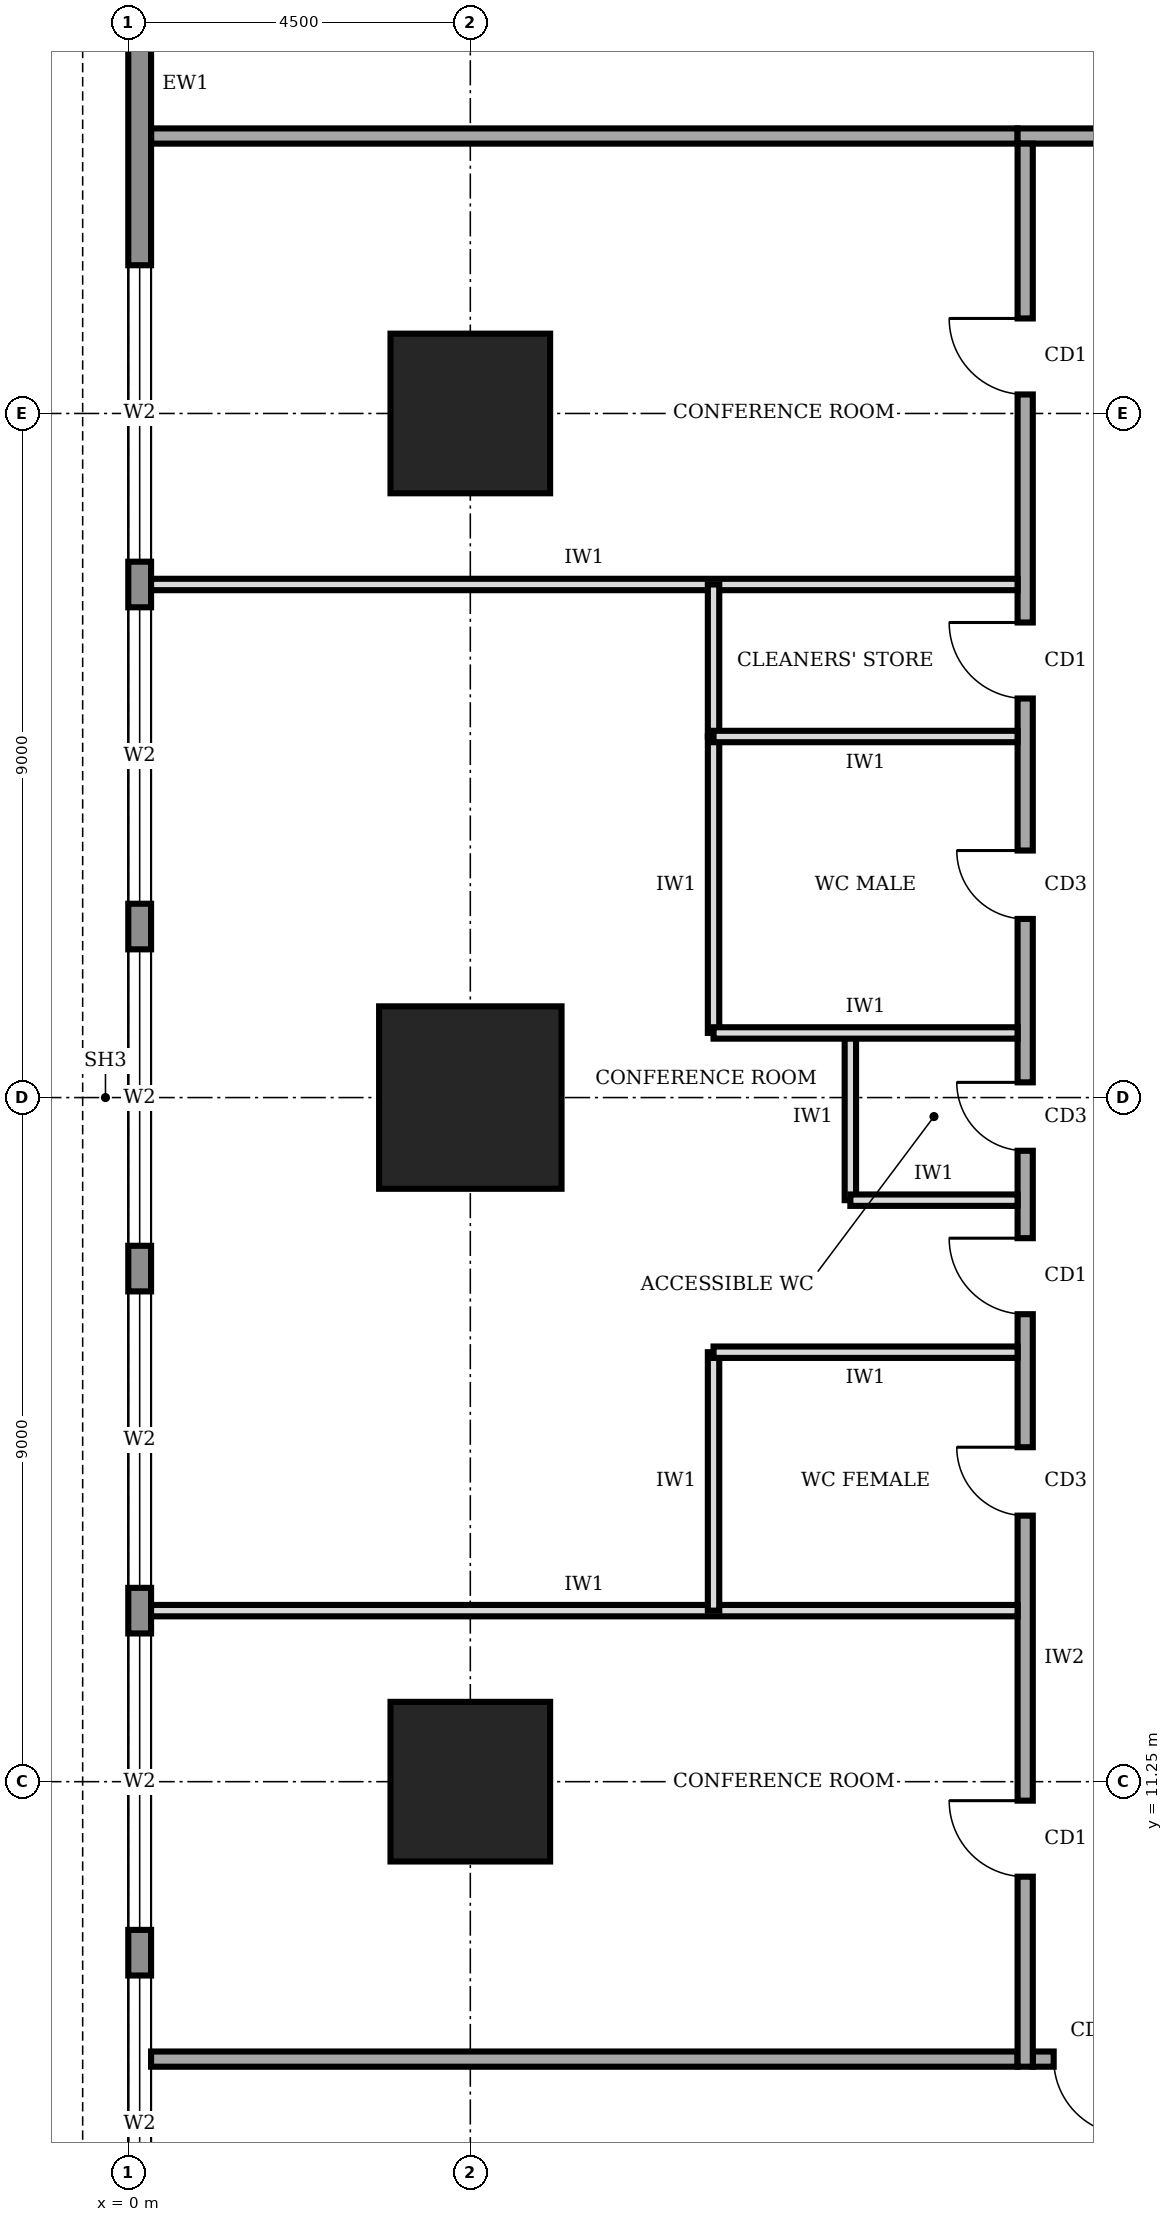
"""IFC4 building model, lengths in metres.
Left out: names, types, materials, properties, quantities, classifications, styles, units other than length and angle.
Written with IfcOpenShell. Run it as: python <this file> out.ifc"""

import sys

from ifc_helpers import new_model, si_unit, direction, frame, frame_2d, origin, origin_2d, place, context, subcontext, project, spatial, rectangle, extrude, element, fill, save


model = new_model("IFC4")
c1 = context("Model", 3, precision=1e-05, world=origin(), true_north=direction((0.0, 1.0)))
c2 = subcontext(c1, "Body", "Model", "MODEL_VIEW")
j1 = project(units=[si_unit("LENGTHUNIT", "METRE"), si_unit("PLANEANGLEUNIT", "RADIAN")], contexts=[c1])
p1 = place(None, origin())
s1 = spatial("IfcSite", under=j1, at=p1, CompositionType="ELEMENT")
p2 = place(p1, origin())
s2 = spatial("IfcBuilding", under=s1, at=p2, CompositionType="ELEMENT")
p3 = place(p2, frame((0.0, 0.0, 153.0)))
s3 = spatial("IfcBuildingStorey", under=s2, at=p3, CompositionType="ELEMENT", Elevation=153.0)
p4 = place(p3, frame((4.5, 11.25, 0.0), z_axis=(0.0, 0.0, 1.0), x_axis=(1.0, 0.0, 0.0)))
e1 = element("IfcColumn", 1, at=p4, inside=s3, PredefinedType="COLUMN", context=c2, shape_type="SweptSolid", body=[
    extrude(rectangle(XDim=2.1, YDim=2.1, at=origin_2d()), origin(), (0.0, 0.0, 1.0), 4.0),
])
p5 = place(p3, frame((4.5, 20.25, 0.0), z_axis=(0.0, 0.0, 1.0), x_axis=(1.0, 0.0, 0.0)))
e2 = element("IfcColumn", 2, at=p5, inside=s3, PredefinedType="COLUMN", context=c2, shape_type="SweptSolid", body=[
    extrude(rectangle(XDim=2.4, YDim=2.4, at=origin_2d()), origin(), (0.0, 0.0, 1.0), 4.0),
])
p6 = place(p3, frame((4.5, 29.25, 0.0), z_axis=(0.0, 0.0, 1.0), x_axis=(1.0, 0.0, 0.0)))
e3 = element("IfcColumn", 3, at=p6, inside=s3, PredefinedType="COLUMN", context=c2, shape_type="SweptSolid", body=[
    extrude(rectangle(XDim=2.1, YDim=2.1, at=origin_2d()), origin(), (0.0, 0.0, 1.0), 4.0),
])
p7 = place(p3, frame((0.15, 35.98, 0.0), z_axis=(0.0, 0.0, 1.0), x_axis=(0.0, -1.0, 0.0)))
e4 = element("IfcWall", 4, at=p7, inside=s3, PredefinedType="STANDARD", context=c2, shape_type="SweptSolid", body=[
    extrude(rectangle(XDim=31.46, YDim=0.3, at=frame_2d((15.73, 0.0))), origin(), (0.0, 0.0, 1.0), 3.75),
])
p8 = place(p7, frame((27.28, 0.0, 0.6)))
e5 = element("IfcOpeningElement", 5, at=p8, cuts=e4, PredefinedType="OPENING", context=c2, shape_type="SweptSolid", body=[
    extrude(rectangle(XDim=3.9, YDim=2.6, at=frame_2d((1.95, 1.3))), frame((0.0, 0.16, 0.0), z_axis=(0.0, -1.0, 0.0), x_axis=(1.0, 0.0, 0.0)), (0.0, 0.0, 1.0), 0.32),
])
p9 = place(p7, frame((22.78, 0.0, 0.6)))
e6 = element("IfcOpeningElement", 6, at=p9, cuts=e4, PredefinedType="OPENING", context=c2, shape_type="SweptSolid", body=[
    extrude(rectangle(XDim=3.9, YDim=2.6, at=frame_2d((1.95, 1.3))), frame((0.0, 0.16, 0.0), z_axis=(0.0, -1.0, 0.0), x_axis=(1.0, 0.0, 0.0)), (0.0, 0.0, 1.0), 0.32),
])
p10 = place(p7, frame((18.28, 0.0, 0.6)))
e7 = element("IfcOpeningElement", 7, at=p10, cuts=e4, PredefinedType="OPENING", context=c2, shape_type="SweptSolid", body=[
    extrude(rectangle(XDim=3.9, YDim=2.6, at=frame_2d((1.95, 1.3))), frame((0.0, 0.16, 0.0), z_axis=(0.0, -1.0, 0.0), x_axis=(1.0, 0.0, 0.0)), (0.0, 0.0, 1.0), 0.32),
])
p11 = place(p7, frame((13.78, 0.0, 0.6)))
e8 = element("IfcOpeningElement", 8, at=p11, cuts=e4, PredefinedType="OPENING", context=c2, shape_type="SweptSolid", body=[
    extrude(rectangle(XDim=3.9, YDim=2.6, at=frame_2d((1.95, 1.3))), frame((0.0, 0.16, 0.0), z_axis=(0.0, -1.0, 0.0), x_axis=(1.0, 0.0, 0.0)), (0.0, 0.0, 1.0), 0.32),
])
p12 = place(p7, frame((9.28, 0.0, 0.6)))
e9 = element("IfcOpeningElement", 9, at=p12, cuts=e4, PredefinedType="OPENING", context=c2, shape_type="SweptSolid", body=[
    extrude(rectangle(XDim=3.9, YDim=2.6, at=frame_2d((1.95, 1.3))), frame((0.0, 0.16, 0.0), z_axis=(0.0, -1.0, 0.0), x_axis=(1.0, 0.0, 0.0)), (0.0, 0.0, 1.0), 0.32),
])
p13 = place(p7, frame((4.78, 0.0, 0.6)))
e10 = element("IfcOpeningElement", 10, at=p13, cuts=e4, PredefinedType="OPENING", context=c2, shape_type="SweptSolid", body=[
    extrude(rectangle(XDim=3.9, YDim=2.6, at=frame_2d((1.95, 1.3))), frame((0.0, 0.16, 0.0), z_axis=(0.0, -1.0, 0.0), x_axis=(1.0, 0.0, 0.0)), (0.0, 0.0, 1.0), 0.32),
])
p14 = place(p3, frame((11.9, 7.6, 0.0), z_axis=(0.0, 0.0, 1.0), x_axis=(1.0, 0.0, 0.0)))
e11 = element("IfcWall", 11, at=p14, inside=s3, PredefinedType="SOLIDWALL", context=c2, shape_type="SweptSolid", body=[
    extrude(rectangle(XDim=28.3, YDim=0.2, at=frame_2d((14.15, 0.0))), origin(), (0.0, 0.0, 1.0), 3.75),
])
p15 = place(p14, frame((0.275, 0.0, 0.0)))
e12 = element("IfcOpeningElement", 12, at=p15, cuts=e11, PredefinedType="OPENING", context=c2, shape_type="SweptSolid", body=[
    extrude(rectangle(XDim=1.0, YDim=2.1, at=frame_2d((0.5, 1.05))), frame((0.0, 0.11, 0.0), z_axis=(0.0, -1.0, 0.0), x_axis=(1.0, 0.0, 0.0)), (0.0, 0.0, 1.0), 0.22),
])
p16 = place(p14, frame((14.35, 0.0, 0.0)))
e13 = element("IfcOpeningElement", 13, at=p16, cuts=e11, PredefinedType="OPENING", context=c2, shape_type="SweptSolid", body=[
    extrude(rectangle(XDim=1.4, YDim=2.1, at=frame_2d((0.7, 1.05))), frame((0.0, 0.11, 0.0), z_axis=(0.0, -1.0, 0.0), x_axis=(1.0, 0.0, 0.0)), (0.0, 0.0, 1.0), 0.22),
])
p17 = place(p3, frame((40.2, 32.9, 0.0), z_axis=(0.0, 0.0, 1.0), x_axis=(-1.0, 0.0, 0.0)))
e14 = element("IfcWall", 14, at=p17, inside=s3, PredefinedType="SOLIDWALL", context=c2, shape_type="SweptSolid", body=[
    extrude(rectangle(XDim=28.5, YDim=0.2, at=frame_2d((14.25, 0.0))), origin(), (0.0, 0.0, 1.0), 3.75),
])
p18 = place(p17, frame((24.55, 0.0, 0.0)))
e15 = element("IfcOpeningElement", 15, at=p18, cuts=e14, PredefinedType="OPENING", context=c2, shape_type="SweptSolid", body=[
    extrude(rectangle(XDim=1.8, YDim=2.1, at=frame_2d((0.9, 1.05))), frame((0.0, 0.11, 0.0), z_axis=(0.0, -1.0, 0.0), x_axis=(1.0, 0.0, 0.0)), (0.0, 0.0, 1.0), 0.22),
])
p19 = place(p17, frame((17.2, 0.0, 0.0)))
e16 = element("IfcOpeningElement", 16, at=p19, cuts=e14, PredefinedType="OPENING", context=c2, shape_type="SweptSolid", body=[
    extrude(rectangle(XDim=1.0, YDim=2.1, at=frame_2d((0.5, 1.05))), frame((0.0, 0.11, 0.0), z_axis=(0.0, -1.0, 0.0), x_axis=(1.0, 0.0, 0.0)), (0.0, 0.0, 1.0), 0.22),
])
p20 = place(p17, frame((6.0, 0.0, 0.0)))
e17 = element("IfcOpeningElement", 17, at=p20, cuts=e14, PredefinedType="OPENING", context=c2, shape_type="SweptSolid", body=[
    extrude(rectangle(XDim=1.0, YDim=2.1, at=frame_2d((0.5, 1.05))), frame((0.0, 0.11, 0.0), z_axis=(0.0, -1.0, 0.0), x_axis=(1.0, 0.0, 0.0)), (0.0, 0.0, 1.0), 0.22),
])
p21 = place(p3, frame((11.8, 32.8, 0.0), z_axis=(0.0, 0.0, 1.0), x_axis=(0.0, -1.0, 0.0)))
e18 = element("IfcWall", 18, at=p21, inside=s3, PredefinedType="SOLIDWALL", context=c2, shape_type="SweptSolid", body=[
    extrude(rectangle(XDim=25.3, YDim=0.2, at=frame_2d((12.65, 0.0))), origin(), (0.0, 0.0, 1.0), 3.75),
])
p22 = place(p21, frame((21.8, 0.0, 0.0)))
e19 = element("IfcOpeningElement", 19, at=p22, cuts=e18, PredefinedType="OPENING", context=c2, shape_type="SweptSolid", body=[
    extrude(rectangle(XDim=1.0, YDim=2.1, at=frame_2d((0.5, 1.05))), frame((0.0, 0.11, 0.0), z_axis=(0.0, -1.0, 0.0), x_axis=(1.0, 0.0, 0.0)), (0.0, 0.0, 1.0), 0.22),
])
p23 = place(p21, frame((17.15, 0.0, 0.0)))
e20 = element("IfcOpeningElement", 20, at=p23, cuts=e18, PredefinedType="OPENING", context=c2, shape_type="SweptSolid", body=[
    extrude(rectangle(XDim=0.9, YDim=2.1, at=frame_2d((0.45, 1.05))), frame((0.0, 0.11, 0.0), z_axis=(0.0, -1.0, 0.0), x_axis=(1.0, 0.0, 0.0)), (0.0, 0.0, 1.0), 0.22),
])
p24 = place(p21, frame((12.35, 0.0, 0.0)))
e21 = element("IfcOpeningElement", 21, at=p24, cuts=e18, PredefinedType="OPENING", context=c2, shape_type="SweptSolid", body=[
    extrude(rectangle(XDim=0.9, YDim=2.1, at=frame_2d((0.45, 1.05))), frame((0.0, 0.11, 0.0), z_axis=(0.0, -1.0, 0.0), x_axis=(1.0, 0.0, 0.0)), (0.0, 0.0, 1.0), 0.22),
])
p25 = place(p21, frame((9.3, 0.0, 0.0)))
e22 = element("IfcOpeningElement", 22, at=p25, cuts=e18, PredefinedType="OPENING", context=c2, shape_type="SweptSolid", body=[
    extrude(rectangle(XDim=0.9, YDim=2.1, at=frame_2d((0.45, 1.05))), frame((0.0, 0.11, 0.0), z_axis=(0.0, -1.0, 0.0), x_axis=(1.0, 0.0, 0.0)), (0.0, 0.0, 1.0), 0.22),
])
p26 = place(p21, frame((6.3, 0.0, 0.0)))
e23 = element("IfcOpeningElement", 23, at=p26, cuts=e18, PredefinedType="OPENING", context=c2, shape_type="SweptSolid", body=[
    extrude(rectangle(XDim=1.0, YDim=2.1, at=frame_2d((0.5, 1.05))), frame((0.0, 0.11, 0.0), z_axis=(0.0, -1.0, 0.0), x_axis=(1.0, 0.0, 0.0)), (0.0, 0.0, 1.0), 0.22),
])
p27 = place(p21, frame((14.4, 0.0, 0.0)))
e24 = element("IfcOpeningElement", 24, at=p27, cuts=e18, PredefinedType="OPENING", context=c2, shape_type="SweptSolid", body=[
    extrude(rectangle(XDim=1.0, YDim=2.1, at=frame_2d((0.5, 1.05))), frame((0.0, 0.11, 0.0), z_axis=(0.0, -1.0, 0.0), x_axis=(1.0, 0.0, 0.0)), (0.0, 0.0, 1.0), 0.22),
])
p28 = place(p21, frame((2.3, 0.0, 0.0)))
e25 = element("IfcOpeningElement", 25, at=p28, cuts=e18, PredefinedType="OPENING", context=c2, shape_type="SweptSolid", body=[
    extrude(rectangle(XDim=1.0, YDim=2.1, at=frame_2d((0.5, 1.05))), frame((0.0, 0.11, 0.0), z_axis=(0.0, -1.0, 0.0), x_axis=(1.0, 0.0, 0.0)), (0.0, 0.0, 1.0), 0.22),
])
for number, where, z_axis, x_axis in (
    (26, (0.3, 7.6, 0.0), (0.0, 0.0, 1.0), (1.0, 0.0, 0.0)),
    (27, (0.3, 32.9, 0.0), (0.0, 0.0, 1.0), (1.0, 0.0, 0.0)),
):
    element("IfcWall", number, at=place(p3, frame(where, z_axis=z_axis, x_axis=x_axis)), inside=s3, PredefinedType="SOLIDWALL", context=c2, shape_type="SweptSolid", body=[
        extrude(rectangle(XDim=11.4, YDim=0.2, at=frame_2d((5.7, 0.0))), origin(), (0.0, 0.0, 1.0), 3.75),
    ])
for number, where, z_axis, x_axis in (
    (28, (0.3, 13.5, 0.0), (0.0, 0.0, 1.0), (1.0, 0.0, 0.0)),
    (29, (0.3, 27.0, 0.0), (0.0, 0.0, 1.0), (1.0, 0.0, 0.0)),
):
    element("IfcWall", number, at=place(p3, frame(where, z_axis=z_axis, x_axis=x_axis)), inside=s3, PredefinedType="PARTITIONING", context=c2, shape_type="SweptSolid", body=[
        extrude(rectangle(XDim=11.4, YDim=0.15, at=frame_2d((5.7, 0.0))), origin(), (0.0, 0.0, 1.0), 3.75),
    ])
p29 = place(p3, frame((11.7, 16.9, 0.0), z_axis=(0.0, 0.0, 1.0), x_axis=(-1.0, 0.0, 0.0)))
e30 = element("IfcWall", 30, at=p29, inside=s3, PredefinedType="PARTITIONING", context=c2, shape_type="SweptSolid", body=[
    extrude(rectangle(XDim=4.0, YDim=0.15, at=frame_2d((2.0, 0.0))), origin(), (0.0, 0.0, 1.0), 3.75),
])
p30 = place(p3, frame((11.7, 18.9, 0.0), z_axis=(0.0, 0.0, 1.0), x_axis=(-1.0, 0.0, 0.0)))
e31 = element("IfcWall", 31, at=p30, inside=s3, PredefinedType="PARTITIONING", context=c2, shape_type="SweptSolid", body=[
    extrude(rectangle(XDim=2.2, YDim=0.15, at=frame_2d((1.1, 0.0))), origin(), (0.0, 0.0, 1.0), 3.75),
])
p31 = place(p3, frame((11.7, 21.1, 0.0), z_axis=(0.0, 0.0, 1.0), x_axis=(-1.0, 0.0, 0.0)))
e32 = element("IfcWall", 32, at=p31, inside=s3, PredefinedType="PARTITIONING", context=c2, shape_type="SweptSolid", body=[
    extrude(rectangle(XDim=4.0, YDim=0.15, at=frame_2d((2.0, 0.0))), origin(), (0.0, 0.0, 1.0), 2.85),
])
p32 = place(p3, frame((11.7, 25.0, 0.0), z_axis=(0.0, 0.0, 1.0), x_axis=(-1.0, 0.0, 0.0)))
e33 = element("IfcWall", 33, at=p32, inside=s3, PredefinedType="PARTITIONING", context=c2, shape_type="SweptSolid", body=[
    extrude(rectangle(XDim=4.0, YDim=0.15, at=frame_2d((2.0, 0.0))), origin(), (0.0, 0.0, 1.0), 3.75),
])
p33 = place(p3, frame((7.7, 13.5, 0.0), z_axis=(0.0, 0.0, 1.0), x_axis=(0.0, 1.0, 0.0)))
e34 = element("IfcWall", 34, at=p33, inside=s3, PredefinedType="PARTITIONING", context=c2, shape_type="SweptSolid", body=[
    extrude(rectangle(XDim=3.4, YDim=0.15, at=frame_2d((1.7, 0.0))), origin(), (0.0, 0.0, 1.0), 3.75),
])
p34 = place(p3, frame((9.5, 18.9, 0.0), z_axis=(0.0, 0.0, 1.0), x_axis=(0.0, 1.0, 0.0)))
e35 = element("IfcWall", 35, at=p34, inside=s3, PredefinedType="PARTITIONING", context=c2, shape_type="SweptSolid", body=[
    extrude(rectangle(XDim=2.2, YDim=0.15, at=frame_2d((1.1, 0.0))), origin(), (0.0, 0.0, 1.0), 3.75),
])
p35 = place(p3, frame((7.7, 21.1, 0.0), z_axis=(0.0, 0.0, 1.0), x_axis=(0.0, 1.0, 0.0)))
e36 = element("IfcWall", 36, at=p35, inside=s3, PredefinedType="PARTITIONING", context=c2, shape_type="SweptSolid", body=[
    extrude(rectangle(XDim=3.9, YDim=0.15, at=frame_2d((1.95, 0.0))), origin(), (0.0, 0.0, 1.0), 3.75),
])
p36 = place(p3, frame((7.7, 25.0, 0.0), z_axis=(0.0, 0.0, 1.0), x_axis=(0.0, 1.0, 0.0)))
e37 = element("IfcWall", 37, at=p36, inside=s3, PredefinedType="PARTITIONING", context=c2, shape_type="SweptSolid", body=[
    extrude(rectangle(XDim=2.0, YDim=0.15, at=frame_2d((1.0, 0.0))), origin(), (0.0, 0.0, 1.0), 3.75),
])
p37 = place(p8, origin())
e38 = element("IfcWindow", 38, at=p37, inside=s3, PartitioningType="SINGLE_PANEL", PredefinedType="WINDOW", context=c2, shape_type="SweptSolid", body=[
    extrude(rectangle(XDim=3.9, YDim=2.6, at=frame_2d((1.95, 1.3))), frame((0.0, 0.03, 0.0), z_axis=(0.0, -1.0, 0.0), x_axis=(1.0, 0.0, 0.0)), (0.0, 0.0, 1.0), 0.06),
])
fill(e5, e38)
p38 = place(p9, origin())
e39 = element("IfcWindow", 39, at=p38, inside=s3, PartitioningType="SINGLE_PANEL", PredefinedType="WINDOW", context=c2, shape_type="SweptSolid", body=[
    extrude(rectangle(XDim=3.9, YDim=2.6, at=frame_2d((1.95, 1.3))), frame((0.0, 0.03, 0.0), z_axis=(0.0, -1.0, 0.0), x_axis=(1.0, 0.0, 0.0)), (0.0, 0.0, 1.0), 0.06),
])
fill(e6, e39)
p39 = place(p10, origin())
e40 = element("IfcWindow", 40, at=p39, inside=s3, PartitioningType="SINGLE_PANEL", PredefinedType="WINDOW", context=c2, shape_type="SweptSolid", body=[
    extrude(rectangle(XDim=3.9, YDim=2.6, at=frame_2d((1.95, 1.3))), frame((0.0, 0.03, 0.0), z_axis=(0.0, -1.0, 0.0), x_axis=(1.0, 0.0, 0.0)), (0.0, 0.0, 1.0), 0.06),
])
fill(e7, e40)
p40 = place(p11, origin())
e41 = element("IfcWindow", 41, at=p40, inside=s3, PartitioningType="SINGLE_PANEL", PredefinedType="WINDOW", context=c2, shape_type="SweptSolid", body=[
    extrude(rectangle(XDim=3.9, YDim=2.6, at=frame_2d((1.95, 1.3))), frame((0.0, 0.03, 0.0), z_axis=(0.0, -1.0, 0.0), x_axis=(1.0, 0.0, 0.0)), (0.0, 0.0, 1.0), 0.06),
])
fill(e8, e41)
p41 = place(p12, origin())
e42 = element("IfcWindow", 42, at=p41, inside=s3, PartitioningType="SINGLE_PANEL", PredefinedType="WINDOW", context=c2, shape_type="SweptSolid", body=[
    extrude(rectangle(XDim=3.9, YDim=2.6, at=frame_2d((1.95, 1.3))), frame((0.0, 0.03, 0.0), z_axis=(0.0, -1.0, 0.0), x_axis=(1.0, 0.0, 0.0)), (0.0, 0.0, 1.0), 0.06),
])
fill(e9, e42)
p42 = place(p13, origin())
e43 = element("IfcWindow", 43, at=p42, inside=s3, PartitioningType="SINGLE_PANEL", PredefinedType="WINDOW", context=c2, shape_type="SweptSolid", body=[
    extrude(rectangle(XDim=3.9, YDim=2.6, at=frame_2d((1.95, 1.3))), frame((0.0, 0.03, 0.0), z_axis=(0.0, -1.0, 0.0), x_axis=(1.0, 0.0, 0.0)), (0.0, 0.0, 1.0), 0.06),
])
fill(e10, e43)
p43 = place(p15, frame((1.0, 0.0, 0.0), z_axis=(0.0, 0.0, 1.0), x_axis=(-1.0, 0.0, 0.0)))
e44 = element("IfcDoor", 44, at=p43, inside=s3, OperationType="SINGLE_SWING_LEFT", PredefinedType="DOOR", context=c2, shape_type="SweptSolid", body=[
    extrude(rectangle(XDim=1.0, YDim=2.1, at=frame_2d((0.5, 1.05))), frame((0.0, 0.025, 0.0), z_axis=(0.0, -1.0, 0.0), x_axis=(1.0, 0.0, 0.0)), (0.0, 0.0, 1.0), 0.05),
])
fill(e12, e44)
p44 = place(p22, frame((1.0, 0.0, 0.0), z_axis=(0.0, 0.0, 1.0), x_axis=(-1.0, 0.0, 0.0)))
e45 = element("IfcDoor", 45, at=p44, inside=s3, OperationType="SINGLE_SWING_RIGHT", PredefinedType="DOOR", context=c2, shape_type="SweptSolid", body=[
    extrude(rectangle(XDim=1.0, YDim=2.1, at=frame_2d((0.5, 1.05))), frame((0.0, 0.025, 0.0), z_axis=(0.0, -1.0, 0.0), x_axis=(1.0, 0.0, 0.0)), (0.0, 0.0, 1.0), 0.05),
])
fill(e19, e45)
p45 = place(p23, frame((0.9, 0.0, 0.0), z_axis=(0.0, 0.0, 1.0), x_axis=(-1.0, 0.0, 0.0)))
e46 = element("IfcDoor", 46, at=p45, inside=s3, OperationType="SINGLE_SWING_RIGHT", PredefinedType="DOOR", context=c2, shape_type="SweptSolid", body=[
    extrude(rectangle(XDim=0.9, YDim=2.1, at=frame_2d((0.45, 1.05))), frame((0.0, 0.025, 0.0), z_axis=(0.0, -1.0, 0.0), x_axis=(1.0, 0.0, 0.0)), (0.0, 0.0, 1.0), 0.05),
])
fill(e20, e46)
p46 = place(p24, frame((0.9, 0.0, 0.0), z_axis=(0.0, 0.0, 1.0), x_axis=(-1.0, 0.0, 0.0)))
e47 = element("IfcDoor", 47, at=p46, inside=s3, OperationType="SINGLE_SWING_RIGHT", PredefinedType="DOOR", context=c2, shape_type="SweptSolid", body=[
    extrude(rectangle(XDim=0.9, YDim=2.1, at=frame_2d((0.45, 1.05))), frame((0.0, 0.025, 0.0), z_axis=(0.0, -1.0, 0.0), x_axis=(1.0, 0.0, 0.0)), (0.0, 0.0, 1.0), 0.05),
])
fill(e21, e47)
p47 = place(p25, frame((0.9, 0.0, 0.0), z_axis=(0.0, 0.0, 1.0), x_axis=(-1.0, 0.0, 0.0)))
e48 = element("IfcDoor", 48, at=p47, inside=s3, OperationType="SINGLE_SWING_RIGHT", PredefinedType="DOOR", context=c2, shape_type="SweptSolid", body=[
    extrude(rectangle(XDim=0.9, YDim=2.1, at=frame_2d((0.45, 1.05))), frame((0.0, 0.025, 0.0), z_axis=(0.0, -1.0, 0.0), x_axis=(1.0, 0.0, 0.0)), (0.0, 0.0, 1.0), 0.05),
])
fill(e22, e48)
p48 = place(p26, frame((1.0, 0.0, 0.0), z_axis=(0.0, 0.0, 1.0), x_axis=(-1.0, 0.0, 0.0)))
e49 = element("IfcDoor", 49, at=p48, inside=s3, OperationType="SINGLE_SWING_RIGHT", PredefinedType="DOOR", context=c2, shape_type="SweptSolid", body=[
    extrude(rectangle(XDim=1.0, YDim=2.1, at=frame_2d((0.5, 1.05))), frame((0.0, 0.025, 0.0), z_axis=(0.0, -1.0, 0.0), x_axis=(1.0, 0.0, 0.0)), (0.0, 0.0, 1.0), 0.05),
])
fill(e23, e49)
p49 = place(p27, frame((1.0, 0.0, 0.0), z_axis=(0.0, 0.0, 1.0), x_axis=(-1.0, 0.0, 0.0)))
e50 = element("IfcDoor", 50, at=p49, inside=s3, OperationType="SINGLE_SWING_RIGHT", PredefinedType="DOOR", context=c2, shape_type="SweptSolid", body=[
    extrude(rectangle(XDim=1.0, YDim=2.1, at=frame_2d((0.5, 1.05))), frame((0.0, 0.025, 0.0), z_axis=(0.0, -1.0, 0.0), x_axis=(1.0, 0.0, 0.0)), (0.0, 0.0, 1.0), 0.05),
])
fill(e24, e50)
p50 = place(p28, frame((1.0, 0.0, 0.0), z_axis=(0.0, 0.0, 1.0), x_axis=(-1.0, 0.0, 0.0)))
e51 = element("IfcDoor", 51, at=p50, inside=s3, OperationType="SINGLE_SWING_RIGHT", PredefinedType="DOOR", context=c2, shape_type="SweptSolid", body=[
    extrude(rectangle(XDim=1.0, YDim=2.1, at=frame_2d((0.5, 1.05))), frame((0.0, 0.025, 0.0), z_axis=(0.0, -1.0, 0.0), x_axis=(1.0, 0.0, 0.0)), (0.0, 0.0, 1.0), 0.05),
])
fill(e25, e51)
save(model, sys.argv[1])
